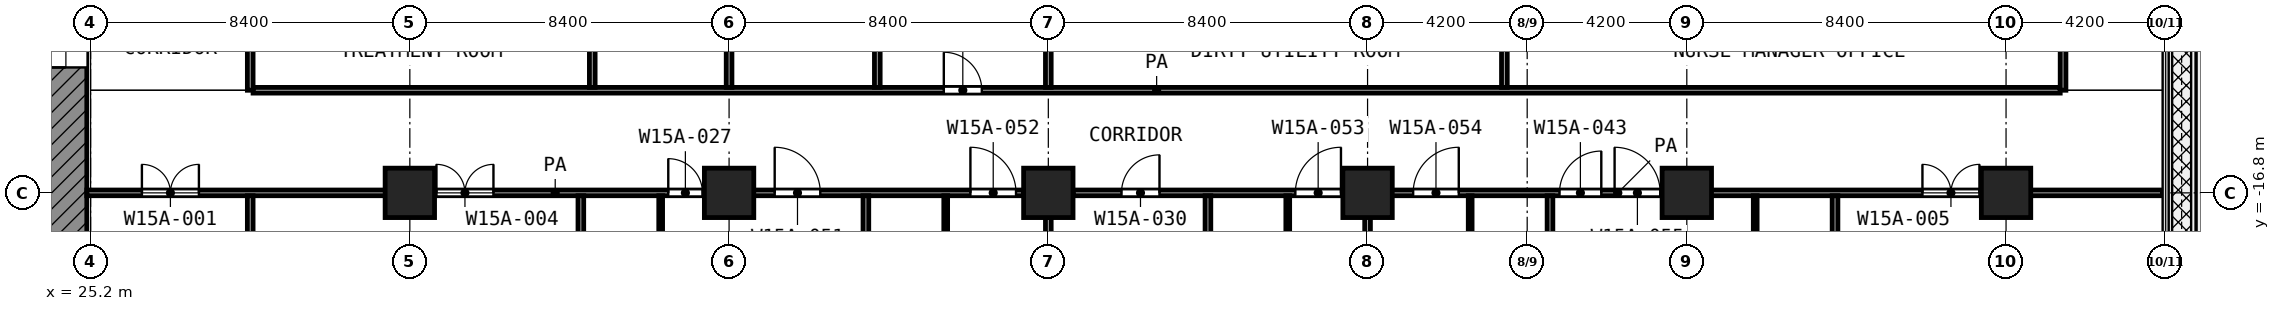
"""IFC4 building model, lengths in metres.
Left out: names, types, materials, properties, quantities, classifications, styles, units other than length and angle.
Written with IfcOpenShell. Run it as: python <this file> out.ifc"""

import sys

from ifc_helpers import new_model, si_unit, direction, frame, frame_2d, origin, origin_2d, place, context, subcontext, project, spatial, rectangle, extrude, element, fill, save


model = new_model("IFC4")
c1 = context("Model", 3, precision=1e-05, world=origin(), true_north=direction((0.0, 1.0)))
c2 = subcontext(c1, "Body", "Model", "MODEL_VIEW")
j1 = project(units=[si_unit("LENGTHUNIT", "METRE"), si_unit("PLANEANGLEUNIT", "RADIAN")], contexts=[c1])
p1 = place(None, origin())
s1 = spatial("IfcSite", under=j1, at=p1, CompositionType="ELEMENT")
p2 = place(p1, origin())
s2 = spatial("IfcBuilding", under=s1, at=p2, CompositionType="ELEMENT")
p3 = place(p2, frame((0.0, 0.0, 68.6)))
s3 = spatial("IfcBuildingStorey", under=s2, at=p3, CompositionType="ELEMENT", Elevation=68.6)
for number, where, z_axis, x_axis in (
    (1, (33.6, -16.8, 0.0), (0.0, 0.0, 1.0), (1.0, 0.0, 0.0)),
    (2, (42.0, -16.8, 0.0), (0.0, 0.0, 1.0), (1.0, 0.0, 0.0)),
    (3, (50.4, -16.8, 0.0), (0.0, 0.0, 1.0), (1.0, 0.0, 0.0)),
    (4, (58.8, -16.8, 0.0), (0.0, 0.0, 1.0), (1.0, 0.0, 0.0)),
    (5, (67.2, -16.8, 0.0), (0.0, 0.0, 1.0), (1.0, 0.0, 0.0)),
    (6, (75.6, -16.8, 0.0), (0.0, 0.0, 1.0), (1.0, 0.0, 0.0)),
):
    element("IfcColumn", number, at=place(p3, frame(where, z_axis=z_axis, x_axis=x_axis)), inside=s3, PredefinedType="COLUMN", context=c2, shape_type="SweptSolid", body=[
        extrude(rectangle(XDim=1.3, YDim=1.3, at=origin_2d()), origin(), (0.0, 0.0, 1.0), 4.2),
    ])
p4 = place(p3, frame((24.55, -24.0, 0.0), z_axis=(0.0, 0.0, 1.0), x_axis=(0.0, 1.0, 0.0)))
e7 = element("IfcWall", 7, at=p4, inside=s3, PredefinedType="SHEAR", context=c2, shape_type="SweptSolid", body=[
    extrude(rectangle(XDim=18.6, YDim=1.1, at=frame_2d((9.3, 0.0))), origin(), (0.0, 0.0, 1.0), 3.9),
])
p5 = place(p4, frame((10.5, 0.0, 0.0)))
e8 = element("IfcOpeningElement", 8, at=p5, cuts=e7, PredefinedType="OPENING", context=c2, shape_type="SweptSolid", body=[
    extrude(rectangle(XDim=1.8, YDim=2.1, at=frame_2d((0.9, 1.05))), frame((0.0, 0.56, 0.0), z_axis=(0.0, -1.0, 0.0), x_axis=(1.0, 0.0, 0.0)), (0.0, 0.0, 1.0), 1.12),
])
p6 = place(p3, frame((40.2, -19.499, 0.0), z_axis=(0.0, 0.0, 1.0), x_axis=(0.0, 1.0, 0.0)))
e9 = element("IfcWall", 9, at=p6, inside=s3, PredefinedType="PARTITIONING", context=c2, shape_type="SweptSolid", body=[
    extrude(rectangle(XDim=2.624, YDim=0.1, at=frame_2d((1.312, 0.0))), origin(), (0.0, 0.0, 1.0), 3.9),
])
for number, where, z_axis, x_axis in (
    (10, (47.7, -19.5, 0.0), (0.0, 0.0, 1.0), (0.0, 1.0, 0.0)),
    (11, (56.7, -19.5, 0.0), (0.0, 0.0, 1.0), (0.0, 1.0, 0.0)),
    (12, (61.5, -19.5, 0.0), (0.0, 0.0, 1.0), (0.0, 1.0, 0.0)),
):
    element("IfcWall", number, at=place(p3, frame(where, z_axis=z_axis, x_axis=x_axis)), inside=s3, PredefinedType="PARTITIONING", context=c2, shape_type="SweptSolid", body=[
        extrude(rectangle(XDim=2.625, YDim=0.1, at=frame_2d((1.312, 0.0))), origin(), (0.0, 0.0, 1.0), 3.9),
    ])
p7 = place(p3, frame((69.0, -19.499, 0.0), z_axis=(0.0, 0.0, 1.0), x_axis=(0.0, 1.0, 0.0)))
e13 = element("IfcWall", 13, at=p7, inside=s3, PredefinedType="PARTITIONING", context=c2, shape_type="SweptSolid", body=[
    extrude(rectangle(XDim=2.624, YDim=0.1, at=frame_2d((1.312, 0.0))), origin(), (0.0, 0.0, 1.0), 3.9),
])
p8 = place(p3, frame((25.1, -16.8, 0.0), z_axis=(0.0, 0.0, 1.0), x_axis=(1.0, 0.0, 0.0)))
e14 = element("IfcWall", 14, at=p8, inside=s3, PredefinedType="PARTITIONING", context=c2, shape_type="SweptSolid", body=[
    extrude(rectangle(XDim=24.65, YDim=0.15, at=frame_2d((12.325, 0.0))), origin(), (0.0, 0.0, 1.0), 3.9),
])
p9 = place(p8, frame((1.45, 0.0, 0.0)))
e15 = element("IfcOpeningElement", 15, at=p9, cuts=e14, PredefinedType="OPENING", context=c2, shape_type="SweptSolid", body=[
    extrude(rectangle(XDim=1.5, YDim=2.1, at=frame_2d((0.75, 1.05))), frame((0.0, 0.085, 0.0), z_axis=(0.0, -1.0, 0.0), x_axis=(1.0, 0.0, 0.0)), (0.0, 0.0, 1.0), 0.17),
])
p10 = place(p8, frame((9.2, 0.0, 0.0)))
e16 = element("IfcOpeningElement", 16, at=p10, cuts=e14, PredefinedType="OPENING", context=c2, shape_type="SweptSolid", body=[
    extrude(rectangle(XDim=1.5, YDim=2.1, at=frame_2d((0.75, 1.05))), frame((0.0, 0.085, 0.0), z_axis=(0.0, -1.0, 0.0), x_axis=(1.0, 0.0, 0.0)), (0.0, 0.0, 1.0), 0.17),
])
p11 = place(p8, frame((18.1, 0.0, 0.0)))
e17 = element("IfcOpeningElement", 17, at=p11, cuts=e14, PredefinedType="OPENING", context=c2, shape_type="SweptSolid", body=[
    extrude(rectangle(XDim=1.2, YDim=2.1, at=frame_2d((0.6, 1.05))), frame((0.0, 0.085, 0.0), z_axis=(0.0, -1.0, 0.0), x_axis=(1.0, 0.0, 0.0)), (0.0, 0.0, 1.0), 0.17),
])
p12 = place(p8, frame((15.3, 0.0, 0.0)))
e18 = element("IfcOpeningElement", 18, at=p12, cuts=e14, PredefinedType="OPENING", context=c2, shape_type="SweptSolid", body=[
    extrude(rectangle(XDim=0.9, YDim=2.1, at=frame_2d((0.45, 1.05))), frame((0.0, 0.085, 0.0), z_axis=(0.0, -1.0, 0.0), x_axis=(1.0, 0.0, 0.0)), (0.0, 0.0, 1.0), 0.17),
])
p13 = place(p8, frame((23.25, 0.0, 0.0)))
e19 = element("IfcOpeningElement", 19, at=p13, cuts=e14, PredefinedType="OPENING", context=c2, shape_type="SweptSolid", body=[
    extrude(rectangle(XDim=1.2, YDim=2.1, at=frame_2d((0.6, 1.05))), frame((0.0, 0.085, 0.0), z_axis=(0.0, -1.0, 0.0), x_axis=(1.0, 0.0, 0.0)), (0.0, 0.0, 1.0), 0.17),
])
p14 = place(p3, frame((51.05, -16.8, 0.0), z_axis=(0.0, 0.0, 1.0), x_axis=(1.0, 0.0, 0.0)))
e20 = element("IfcWall", 20, at=p14, inside=s3, PredefinedType="PARTITIONING", context=c2, shape_type="SweptSolid", body=[
    extrude(rectangle(XDim=28.67, YDim=0.15, at=frame_2d((14.335, 0.0))), origin(), (0.0, 0.0, 1.0), 3.9),
])
p15 = place(p14, frame((1.275, 0.0, 0.0)))
e21 = element("IfcOpeningElement", 21, at=p15, cuts=e20, PredefinedType="OPENING", context=c2, shape_type="SweptSolid", body=[
    extrude(rectangle(XDim=1.0, YDim=2.1, at=frame_2d((0.5, 1.05))), frame((0.0, 0.085, 0.0), z_axis=(0.0, -1.0, 0.0), x_axis=(1.0, 0.0, 0.0)), (0.0, 0.0, 1.0), 0.17),
])
p16 = place(p14, frame((5.85, 0.0, 0.0)))
e22 = element("IfcOpeningElement", 22, at=p16, cuts=e20, PredefinedType="OPENING", context=c2, shape_type="SweptSolid", body=[
    extrude(rectangle(XDim=1.2, YDim=2.1, at=frame_2d((0.6, 1.05))), frame((0.0, 0.085, 0.0), z_axis=(0.0, -1.0, 0.0), x_axis=(1.0, 0.0, 0.0)), (0.0, 0.0, 1.0), 0.17),
])
p17 = place(p14, frame((8.95, 0.0, 0.0)))
e23 = element("IfcOpeningElement", 23, at=p17, cuts=e20, PredefinedType="OPENING", context=c2, shape_type="SweptSolid", body=[
    extrude(rectangle(XDim=1.2, YDim=2.1, at=frame_2d((0.6, 1.05))), frame((0.0, 0.085, 0.0), z_axis=(0.0, -1.0, 0.0), x_axis=(1.0, 0.0, 0.0)), (0.0, 0.0, 1.0), 0.17),
])
p18 = place(p14, frame((14.25, 0.0, 0.0)))
e24 = element("IfcOpeningElement", 24, at=p18, cuts=e20, PredefinedType="OPENING", context=c2, shape_type="SweptSolid", body=[
    extrude(rectangle(XDim=1.2, YDim=2.1, at=frame_2d((0.6, 1.05))), frame((0.0, 0.085, 0.0), z_axis=(0.0, -1.0, 0.0), x_axis=(1.0, 0.0, 0.0)), (0.0, 0.0, 1.0), 0.17),
])
p19 = place(p14, frame((12.8, 0.0, 0.0)))
e25 = element("IfcOpeningElement", 25, at=p19, cuts=e20, PredefinedType="OPENING", context=c2, shape_type="SweptSolid", body=[
    extrude(rectangle(XDim=1.1, YDim=2.1, at=frame_2d((0.55, 1.05))), frame((0.0, 0.085, 0.0), z_axis=(0.0, -1.0, 0.0), x_axis=(1.0, 0.0, 0.0)), (0.0, 0.0, 1.0), 0.17),
])
p20 = place(p14, frame((22.35, 0.0, 0.0)))
e26 = element("IfcOpeningElement", 26, at=p20, cuts=e20, PredefinedType="OPENING", context=c2, shape_type="SweptSolid", body=[
    extrude(rectangle(XDim=1.5, YDim=2.1, at=frame_2d((0.75, 1.05))), frame((0.0, 0.085, 0.0), z_axis=(0.0, -1.0, 0.0), x_axis=(1.0, 0.0, 0.0)), (0.0, 0.0, 1.0), 0.17),
])
p21 = place(p3, frame((29.475, -14.1, 0.0), z_axis=(0.0, 0.0, 1.0), x_axis=(1.0, 0.0, 0.0)))
e27 = element("IfcWall", 27, at=p21, inside=s3, PredefinedType="PARTITIONING", context=c2, shape_type="SweptSolid", body=[
    extrude(rectangle(XDim=47.55, YDim=0.15, at=frame_2d((23.775, 0.0))), origin(), (0.0, 0.0, 1.0), 3.9),
])
p22 = place(p21, frame((18.175, 0.0, 0.0)))
e28 = element("IfcOpeningElement", 28, at=p22, cuts=e27, PredefinedType="OPENING", context=c2, shape_type="SweptSolid", body=[
    extrude(rectangle(XDim=1.0, YDim=2.1, at=frame_2d((0.5, 1.05))), frame((0.0, 0.085, 0.0), z_axis=(0.0, -1.0, 0.0), x_axis=(1.0, 0.0, 0.0)), (0.0, 0.0, 1.0), 0.17),
])
p23 = place(p3, frame((29.4, -25.2, 0.0), z_axis=(0.0, 0.0, 1.0), x_axis=(0.0, 1.0, 0.0)))
e29 = element("IfcWall", 29, at=p23, inside=s3, PredefinedType="PARTITIONING", context=c2, shape_type="SweptSolid", body=[
    extrude(rectangle(XDim=8.325, YDim=0.15, at=frame_2d((4.163, 0.0))), origin(), (0.0, 0.0, 1.0), 3.9),
])
p24 = place(p3, frame((29.4, -14.1, 0.0), z_axis=(0.0, 0.0, 1.0), x_axis=(0.0, 1.0, 0.0)))
e30 = element("IfcWall", 30, at=p24, inside=s3, PredefinedType="PARTITIONING", context=c2, shape_type="SweptSolid", body=[
    extrude(rectangle(XDim=3.0, YDim=0.15, at=frame_2d((1.5, 0.0))), origin(), (0.0, 0.0, 1.0), 3.9),
])
p25 = place(p3, frame((38.1, -25.12, 0.0), z_axis=(0.0, 0.0, 1.0), x_axis=(0.0, 1.0, 0.0)))
e31 = element("IfcWall", 31, at=p25, inside=s3, PredefinedType="PARTITIONING", context=c2, shape_type="SweptSolid", body=[
    extrude(rectangle(XDim=8.245, YDim=0.15, at=frame_2d((4.123, 0.0))), origin(), (0.0, 0.0, 1.0), 3.9),
])
for number, where, z_axis, x_axis in (
    (32, (38.4, -14.025, 0.0), (0.0, 0.0, 1.0), (0.0, 1.0, 0.0)),
    (33, (42.0, -14.025, 0.0), (0.0, 0.0, 1.0), (0.0, 1.0, 0.0)),
):
    element("IfcWall", number, at=place(p3, frame(where, z_axis=z_axis, x_axis=x_axis)), inside=s3, PredefinedType="PARTITIONING", context=c2, shape_type="SweptSolid", body=[
        extrude(rectangle(XDim=2.85, YDim=0.15, at=frame_2d((1.425, 0.0))), origin(), (0.0, 0.0, 1.0), 3.9),
    ])
p26 = place(p3, frame((45.6, -25.12, 0.0), z_axis=(0.0, 0.0, 1.0), x_axis=(0.0, 1.0, 0.0)))
e34 = element("IfcWall", 34, at=p26, inside=s3, PredefinedType="PARTITIONING", context=c2, shape_type="SweptSolid", body=[
    extrude(rectangle(XDim=8.245, YDim=0.15, at=frame_2d((4.123, 0.0))), origin(), (0.0, 0.0, 1.0), 3.9),
])
p27 = place(p3, frame((45.9, -14.025, 0.0), z_axis=(0.0, 0.0, 1.0), x_axis=(0.0, 1.0, 0.0)))
e35 = element("IfcWall", 35, at=p27, inside=s3, PredefinedType="PARTITIONING", context=c2, shape_type="SweptSolid", body=[
    extrude(rectangle(XDim=2.85, YDim=0.15, at=frame_2d((1.425, 0.0))), origin(), (0.0, 0.0, 1.0), 3.9),
])
p28 = place(p3, frame((50.4, -24.6, 0.0), z_axis=(0.0, 0.0, 1.0), x_axis=(0.0, 1.0, 0.0)))
e36 = element("IfcWall", 36, at=p28, inside=s3, PredefinedType="PARTITIONING", context=c2, shape_type="SweptSolid", body=[
    extrude(rectangle(XDim=7.15, YDim=0.15, at=frame_2d((3.575, 0.0))), origin(), (0.0, 0.0, 1.0), 3.9),
])
p29 = place(p3, frame((50.4, -14.025, 0.0), z_axis=(0.0, 0.0, 1.0), x_axis=(0.0, 1.0, 0.0)))
e37 = element("IfcWall", 37, at=p29, inside=s3, PredefinedType="PARTITIONING", context=c2, shape_type="SweptSolid", body=[
    extrude(rectangle(XDim=2.85, YDim=0.15, at=frame_2d((1.425, 0.0))), origin(), (0.0, 0.0, 1.0), 3.9),
])
for number, where, z_axis, x_axis in (
    (38, (54.6, -25.12, 0.0), (0.0, 0.0, 1.0), (0.0, 1.0, 0.0)),
    (39, (58.8, -25.12, 0.0), (0.0, 0.0, 1.0), (0.0, 1.0, 0.0)),
):
    element("IfcWall", number, at=place(p3, frame(where, z_axis=z_axis, x_axis=x_axis)), inside=s3, PredefinedType="PARTITIONING", context=c2, shape_type="SweptSolid", body=[
        extrude(rectangle(XDim=8.245, YDim=0.15, at=frame_2d((4.123, 0.0))), origin(), (0.0, 0.0, 1.0), 3.9),
    ])
p30 = place(p3, frame((62.4, -14.025, 0.0), z_axis=(0.0, 0.0, 1.0), x_axis=(0.0, 1.0, 0.0)))
e40 = element("IfcWall", 40, at=p30, inside=s3, PredefinedType="PARTITIONING", context=c2, shape_type="SweptSolid", body=[
    extrude(rectangle(XDim=2.85, YDim=0.15, at=frame_2d((1.425, 0.0))), origin(), (0.0, 0.0, 1.0), 3.9),
])
for number, where, z_axis, x_axis in (
    (41, (63.6, -25.12, 0.0), (0.0, 0.0, 1.0), (0.0, 1.0, 0.0)),
    (42, (71.1, -25.12, 0.0), (0.0, 0.0, 1.0), (0.0, 1.0, 0.0)),
):
    element("IfcWall", number, at=place(p3, frame(where, z_axis=z_axis, x_axis=x_axis)), inside=s3, PredefinedType="PARTITIONING", context=c2, shape_type="SweptSolid", body=[
        extrude(rectangle(XDim=8.245, YDim=0.15, at=frame_2d((4.123, 0.0))), origin(), (0.0, 0.0, 1.0), 3.9),
    ])
p31 = place(p3, frame((77.1, -14.1, 0.0), z_axis=(0.0, 0.0, 1.0), x_axis=(0.0, 1.0, 0.0)))
e43 = element("IfcWall", 43, at=p31, inside=s3, PredefinedType="PARTITIONING", context=c2, shape_type="SweptSolid", body=[
    extrude(rectangle(XDim=3.0, YDim=0.15, at=frame_2d((1.5, 0.0))), origin(), (0.0, 0.0, 1.0), 3.9),
])
p32 = place(p5, origin())
e44 = element("IfcDoor", 44, at=p32, inside=s3, OperationType="DOUBLE_DOOR_SINGLE_SWING", PredefinedType="DOOR", context=c2, shape_type="SweptSolid", body=[
    extrude(rectangle(XDim=1.8, YDim=2.1, at=frame_2d((0.9, 1.05))), frame((0.0, 0.025, 0.0), z_axis=(0.0, -1.0, 0.0), x_axis=(1.0, 0.0, 0.0)), (0.0, 0.0, 1.0), 0.05),
])
fill(e8, e44)
p33 = place(p9, origin())
e45 = element("IfcDoor", 45, at=p33, inside=s3, OperationType="DOUBLE_DOOR_SINGLE_SWING", PredefinedType="DOOR", context=c2, shape_type="SweptSolid", body=[
    extrude(rectangle(XDim=1.5, YDim=2.1, at=frame_2d((0.75, 1.05))), frame((0.0, 0.025, 0.0), z_axis=(0.0, -1.0, 0.0), x_axis=(1.0, 0.0, 0.0)), (0.0, 0.0, 1.0), 0.05),
])
fill(e15, e45)
p34 = place(p22, origin())
e46 = element("IfcDoor", 46, at=p34, inside=s3, OperationType="SINGLE_SWING_LEFT", PredefinedType="DOOR", context=c2, shape_type="SweptSolid", body=[
    extrude(rectangle(XDim=1.0, YDim=2.1, at=frame_2d((0.5, 1.05))), frame((0.0, 0.025, 0.0), z_axis=(0.0, -1.0, 0.0), x_axis=(1.0, 0.0, 0.0)), (0.0, 0.0, 1.0), 0.05),
])
fill(e28, e46)
p35 = place(p10, origin())
e47 = element("IfcDoor", 47, at=p35, inside=s3, OperationType="DOUBLE_DOOR_SINGLE_SWING", PredefinedType="DOOR", context=c2, shape_type="SweptSolid", body=[
    extrude(rectangle(XDim=1.5, YDim=2.1, at=frame_2d((0.75, 1.05))), frame((0.0, 0.025, 0.0), z_axis=(0.0, -1.0, 0.0), x_axis=(1.0, 0.0, 0.0)), (0.0, 0.0, 1.0), 0.05),
])
fill(e16, e47)
p36 = place(p11, origin())
e48 = element("IfcDoor", 48, at=p36, inside=s3, OperationType="SINGLE_SWING_LEFT", PredefinedType="DOOR", context=c2, shape_type="SweptSolid", body=[
    extrude(rectangle(XDim=1.2, YDim=2.1, at=frame_2d((0.6, 1.05))), frame((0.0, 0.025, 0.0), z_axis=(0.0, -1.0, 0.0), x_axis=(1.0, 0.0, 0.0)), (0.0, 0.0, 1.0), 0.05),
])
fill(e17, e48)
p37 = place(p12, origin())
e49 = element("IfcDoor", 49, at=p37, inside=s3, OperationType="SINGLE_SWING_LEFT", PredefinedType="DOOR", context=c2, shape_type="SweptSolid", body=[
    extrude(rectangle(XDim=0.9, YDim=2.1, at=frame_2d((0.45, 1.05))), frame((0.0, 0.025, 0.0), z_axis=(0.0, -1.0, 0.0), x_axis=(1.0, 0.0, 0.0)), (0.0, 0.0, 1.0), 0.05),
])
fill(e18, e49)
p38 = place(p13, origin())
e50 = element("IfcDoor", 50, at=p38, inside=s3, OperationType="SINGLE_SWING_LEFT", PredefinedType="DOOR", context=c2, shape_type="SweptSolid", body=[
    extrude(rectangle(XDim=1.2, YDim=2.1, at=frame_2d((0.6, 1.05))), frame((0.0, 0.025, 0.0), z_axis=(0.0, -1.0, 0.0), x_axis=(1.0, 0.0, 0.0)), (0.0, 0.0, 1.0), 0.05),
])
fill(e19, e50)
p39 = place(p15, origin())
e51 = element("IfcDoor", 51, at=p39, inside=s3, OperationType="SINGLE_SWING_RIGHT", PredefinedType="DOOR", context=c2, shape_type="SweptSolid", body=[
    extrude(rectangle(XDim=1.0, YDim=2.1, at=frame_2d((0.5, 1.05))), frame((0.0, 0.025, 0.0), z_axis=(0.0, -1.0, 0.0), x_axis=(1.0, 0.0, 0.0)), (0.0, 0.0, 1.0), 0.05),
])
fill(e21, e51)
p40 = place(p16, origin())
e52 = element("IfcDoor", 52, at=p40, inside=s3, OperationType="SINGLE_SWING_RIGHT", PredefinedType="DOOR", context=c2, shape_type="SweptSolid", body=[
    extrude(rectangle(XDim=1.2, YDim=2.1, at=frame_2d((0.6, 1.05))), frame((0.0, 0.025, 0.0), z_axis=(0.0, -1.0, 0.0), x_axis=(1.0, 0.0, 0.0)), (0.0, 0.0, 1.0), 0.05),
])
fill(e22, e52)
p41 = place(p17, origin())
e53 = element("IfcDoor", 53, at=p41, inside=s3, OperationType="SINGLE_SWING_RIGHT", PredefinedType="DOOR", context=c2, shape_type="SweptSolid", body=[
    extrude(rectangle(XDim=1.2, YDim=2.1, at=frame_2d((0.6, 1.05))), frame((0.0, 0.025, 0.0), z_axis=(0.0, -1.0, 0.0), x_axis=(1.0, 0.0, 0.0)), (0.0, 0.0, 1.0), 0.05),
])
fill(e23, e53)
p42 = place(p18, origin())
e54 = element("IfcDoor", 54, at=p42, inside=s3, OperationType="SINGLE_SWING_LEFT", PredefinedType="DOOR", context=c2, shape_type="SweptSolid", body=[
    extrude(rectangle(XDim=1.2, YDim=2.1, at=frame_2d((0.6, 1.05))), frame((0.0, 0.025, 0.0), z_axis=(0.0, -1.0, 0.0), x_axis=(1.0, 0.0, 0.0)), (0.0, 0.0, 1.0), 0.05),
])
fill(e24, e54)
p43 = place(p19, origin())
e55 = element("IfcDoor", 55, at=p43, inside=s3, OperationType="SINGLE_SWING_RIGHT", PredefinedType="DOOR", context=c2, shape_type="SweptSolid", body=[
    extrude(rectangle(XDim=1.1, YDim=2.1, at=frame_2d((0.55, 1.05))), frame((0.0, 0.025, 0.0), z_axis=(0.0, -1.0, 0.0), x_axis=(1.0, 0.0, 0.0)), (0.0, 0.0, 1.0), 0.05),
])
fill(e25, e55)
p44 = place(p20, origin())
e56 = element("IfcDoor", 56, at=p44, inside=s3, OperationType="DOUBLE_DOOR_SINGLE_SWING", PredefinedType="DOOR", context=c2, shape_type="SweptSolid", body=[
    extrude(rectangle(XDim=1.5, YDim=2.1, at=frame_2d((0.75, 1.05))), frame((0.0, 0.025, 0.0), z_axis=(0.0, -1.0, 0.0), x_axis=(1.0, 0.0, 0.0)), (0.0, 0.0, 1.0), 0.05),
])
fill(e26, e56)
save(model, sys.argv[1])
